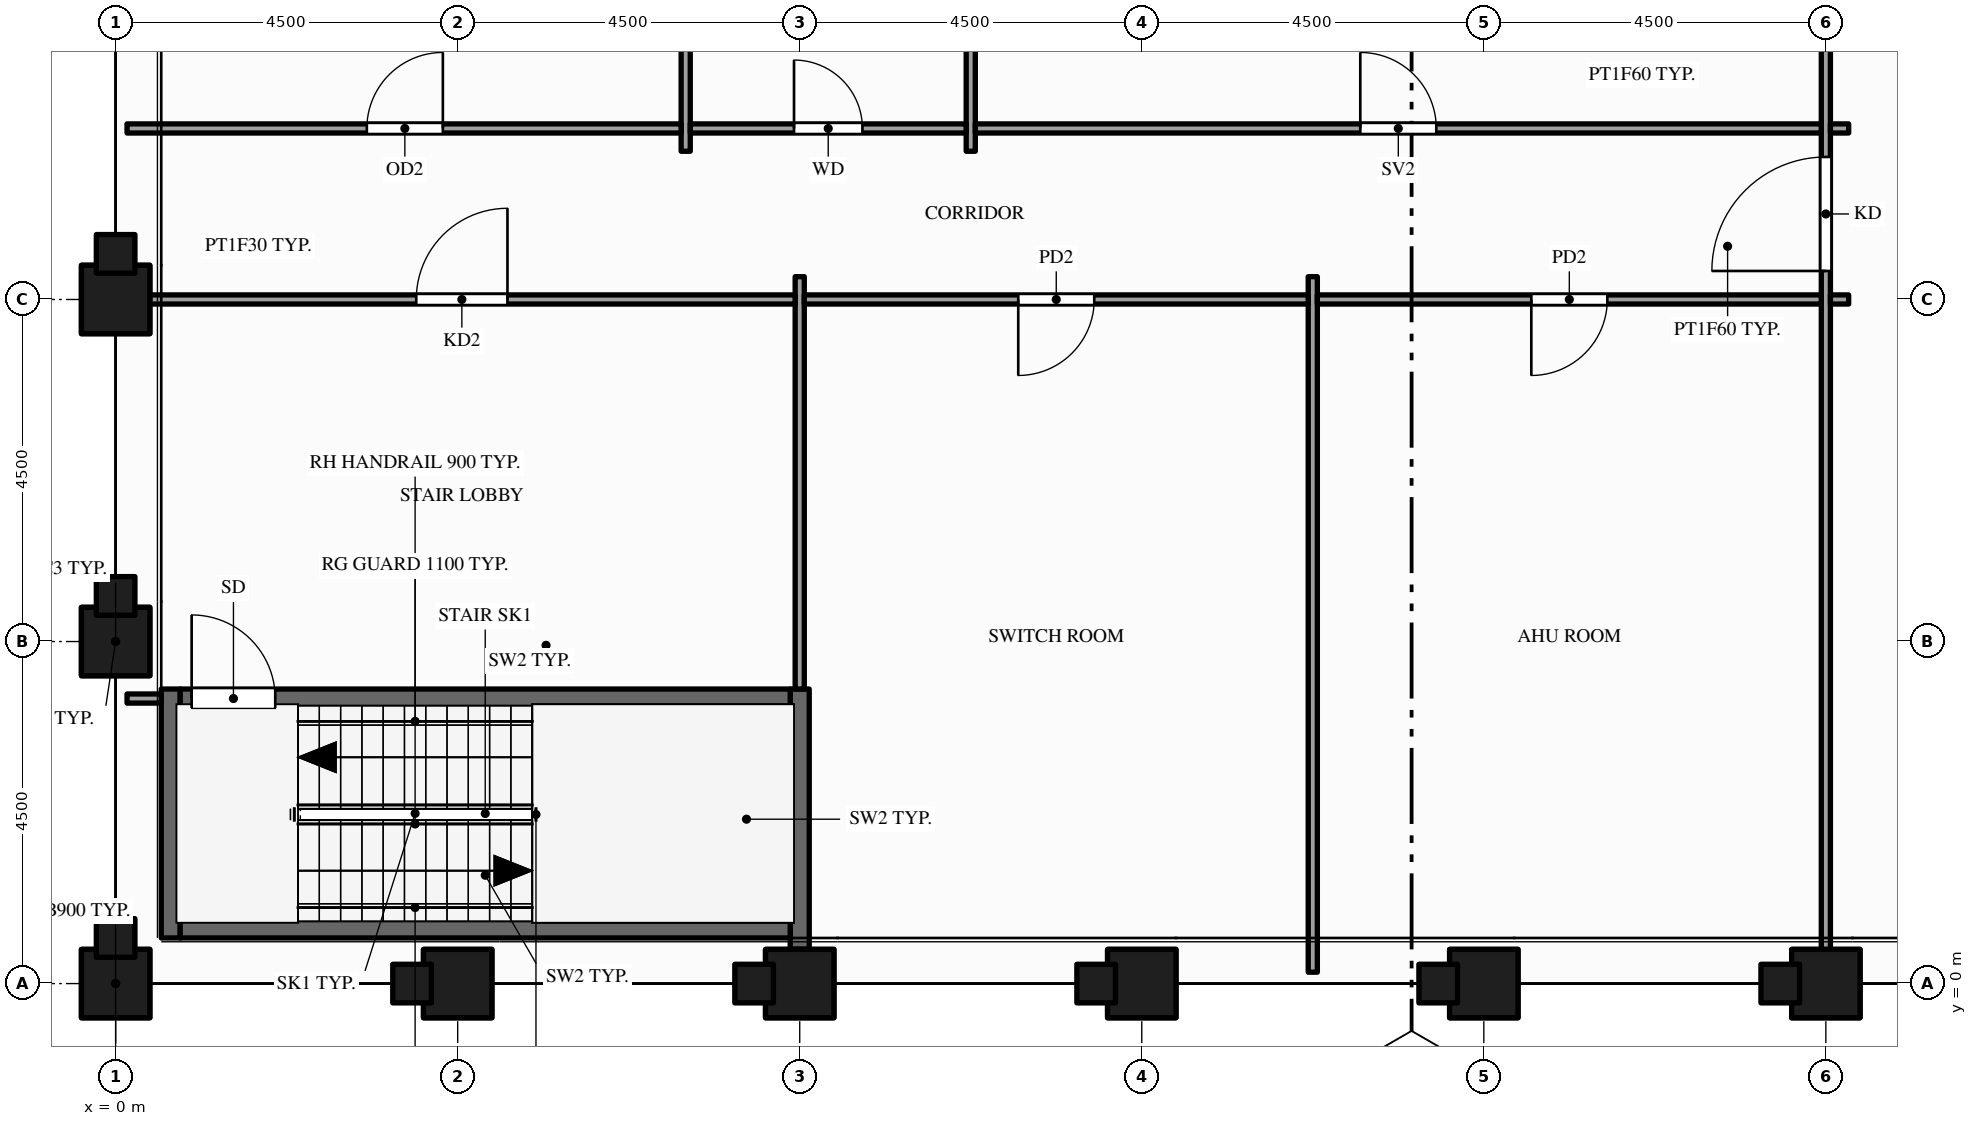
"""IFC4 building model, lengths in metres.
Left out: names, types, materials, properties, quantities, classifications, styles, units other than length and angle.
Written with IfcOpenShell. Run it as: python <this file> out.ifc"""

import sys

from ifc_helpers import new_model, si_unit, direction, frame, frame_2d, origin, origin_2d, place, context, subcontext, project, spatial, rectangle, hollow_rectangle, extrude, element, fill, save


model = new_model("IFC4")
c1 = context("Model", 3, precision=1e-05, world=origin(), true_north=direction((0.0, 1.0)))
c2 = subcontext(c1, "Body", "Model", "MODEL_VIEW")
j1 = project(units=[si_unit("LENGTHUNIT", "METRE"), si_unit("PLANEANGLEUNIT", "RADIAN")], contexts=[c1])
p1 = place(None, origin())
s1 = spatial("IfcSite", under=j1, at=p1, CompositionType="ELEMENT")
p2 = place(p1, origin())
s2 = spatial("IfcBuilding", under=s1, at=p2, CompositionType="ELEMENT")
p3 = place(p2, frame((0.0, 0.0, 187.0)))
s3 = spatial("IfcBuildingStorey", under=s2, at=p3, CompositionType="ELEMENT", Elevation=187.0)
p4 = place(p3, frame((0.0, 0.0, -0.25), z_axis=(0.0, 0.0, 1.0), x_axis=(1.0, 0.0, 0.0)))
e1 = element("IfcColumn", 1, at=p4, inside=s3, PredefinedType="COLUMN", context=c2, shape_type="SweptSolid", body=[
    extrude(hollow_rectangle(XDim=0.9, YDim=0.9, WallThickness=0.045, at=origin_2d()), origin(), (0.0, 0.0, 1.0), 6.6),
])
p5 = place(p3, frame((0.0, 0.0, 6.35), z_axis=(0.0, 0.0, 1.0), x_axis=(1.0, 0.0, 0.0)))
e2 = element("IfcColumn", 2, at=p5, inside=s3, PredefinedType="COLUMN", context=c2, shape_type="SweptSolid", body=[
    extrude(rectangle(XDim=0.9, YDim=0.9, at=origin_2d()), origin(), (0.0, 0.0, 1.0), 1.5),
])
p6 = place(p3, frame((0.0, 4.5, -0.25), z_axis=(0.0, 0.0, 1.0), x_axis=(1.0, 0.0, 0.0)))
e3 = element("IfcColumn", 3, at=p6, inside=s3, PredefinedType="COLUMN", context=c2, shape_type="SweptSolid", body=[
    extrude(hollow_rectangle(XDim=0.9, YDim=0.9, WallThickness=0.045, at=origin_2d()), origin(), (0.0, 0.0, 1.0), 6.6),
])
p7 = place(p3, frame((0.0, 4.5, 6.35), z_axis=(0.0, 0.0, 1.0), x_axis=(1.0, 0.0, 0.0)))
e4 = element("IfcColumn", 4, at=p7, inside=s3, PredefinedType="COLUMN", context=c2, shape_type="SweptSolid", body=[
    extrude(rectangle(XDim=0.9, YDim=0.9, at=origin_2d()), origin(), (0.0, 0.0, 1.0), 1.5),
])
p8 = place(p3, frame((0.0, 9.0, -0.25), z_axis=(0.0, 0.0, 1.0), x_axis=(1.0, 0.0, 0.0)))
e5 = element("IfcColumn", 5, at=p8, inside=s3, PredefinedType="COLUMN", context=c2, shape_type="SweptSolid", body=[
    extrude(hollow_rectangle(XDim=0.9, YDim=0.9, WallThickness=0.045, at=origin_2d()), origin(), (0.0, 0.0, 1.0), 6.6),
])
p9 = place(p3, frame((0.0, 9.0, 6.35), z_axis=(0.0, 0.0, 1.0), x_axis=(1.0, 0.0, 0.0)))
e6 = element("IfcColumn", 6, at=p9, inside=s3, PredefinedType="COLUMN", context=c2, shape_type="SweptSolid", body=[
    extrude(rectangle(XDim=0.9, YDim=0.9, at=origin_2d()), origin(), (0.0, 0.0, 1.0), 1.5),
])
p10 = place(p3, frame((4.5, 0.0, -0.25), z_axis=(0.0, 0.0, 1.0), x_axis=(1.0, 0.0, 0.0)))
e7 = element("IfcColumn", 7, at=p10, inside=s3, PredefinedType="COLUMN", context=c2, shape_type="SweptSolid", body=[
    extrude(hollow_rectangle(XDim=0.9, YDim=0.9, WallThickness=0.045, at=origin_2d()), origin(), (0.0, 0.0, 1.0), 6.6),
])
p11 = place(p3, frame((4.5, 0.0, 6.35), z_axis=(0.0, 0.0, 1.0), x_axis=(1.0, 0.0, 0.0)))
e8 = element("IfcColumn", 8, at=p11, inside=s3, PredefinedType="COLUMN", context=c2, shape_type="SweptSolid", body=[
    extrude(rectangle(XDim=0.9, YDim=0.9, at=origin_2d()), origin(), (0.0, 0.0, 1.0), 1.5),
])
p12 = place(p3, frame((9.0, 0.0, -0.25), z_axis=(0.0, 0.0, 1.0), x_axis=(1.0, 0.0, 0.0)))
e9 = element("IfcColumn", 9, at=p12, inside=s3, PredefinedType="COLUMN", context=c2, shape_type="SweptSolid", body=[
    extrude(hollow_rectangle(XDim=0.9, YDim=0.9, WallThickness=0.045, at=origin_2d()), origin(), (0.0, 0.0, 1.0), 6.6),
])
p13 = place(p3, frame((9.0, 0.0, 6.35), z_axis=(0.0, 0.0, 1.0), x_axis=(1.0, 0.0, 0.0)))
e10 = element("IfcColumn", 10, at=p13, inside=s3, PredefinedType="COLUMN", context=c2, shape_type="SweptSolid", body=[
    extrude(rectangle(XDim=0.9, YDim=0.9, at=origin_2d()), origin(), (0.0, 0.0, 1.0), 1.5),
])
p14 = place(p3, frame((13.5, 0.0, -0.25), z_axis=(0.0, 0.0, 1.0), x_axis=(1.0, 0.0, 0.0)))
e11 = element("IfcColumn", 11, at=p14, inside=s3, PredefinedType="COLUMN", context=c2, shape_type="SweptSolid", body=[
    extrude(hollow_rectangle(XDim=0.9, YDim=0.9, WallThickness=0.045, at=origin_2d()), origin(), (0.0, 0.0, 1.0), 6.6),
])
p15 = place(p3, frame((13.5, 0.0, 6.35), z_axis=(0.0, 0.0, 1.0), x_axis=(1.0, 0.0, 0.0)))
e12 = element("IfcColumn", 12, at=p15, inside=s3, PredefinedType="COLUMN", context=c2, shape_type="SweptSolid", body=[
    extrude(rectangle(XDim=0.9, YDim=0.9, at=origin_2d()), origin(), (0.0, 0.0, 1.0), 1.5),
])
p16 = place(p3, frame((18.0, 0.0, -0.25), z_axis=(0.0, 0.0, 1.0), x_axis=(1.0, 0.0, 0.0)))
e13 = element("IfcColumn", 13, at=p16, inside=s3, PredefinedType="COLUMN", context=c2, shape_type="SweptSolid", body=[
    extrude(hollow_rectangle(XDim=0.9, YDim=0.9, WallThickness=0.045, at=origin_2d()), origin(), (0.0, 0.0, 1.0), 6.6),
])
p17 = place(p3, frame((18.0, 0.0, 6.35), z_axis=(0.0, 0.0, 1.0), x_axis=(1.0, 0.0, 0.0)))
e14 = element("IfcColumn", 14, at=p17, inside=s3, PredefinedType="COLUMN", context=c2, shape_type="SweptSolid", body=[
    extrude(rectangle(XDim=0.9, YDim=0.9, at=origin_2d()), origin(), (0.0, 0.0, 1.0), 1.5),
])
p18 = place(p3, frame((22.5, 0.0, -0.25), z_axis=(0.0, 0.0, 1.0), x_axis=(1.0, 0.0, 0.0)))
e15 = element("IfcColumn", 15, at=p18, inside=s3, PredefinedType="COLUMN", context=c2, shape_type="SweptSolid", body=[
    extrude(hollow_rectangle(XDim=0.9, YDim=0.9, WallThickness=0.045, at=origin_2d()), origin(), (0.0, 0.0, 1.0), 6.6),
])
p19 = place(p3, frame((22.5, 0.0, 6.35), z_axis=(0.0, 0.0, 1.0), x_axis=(1.0, 0.0, 0.0)))
e16 = element("IfcColumn", 16, at=p19, inside=s3, PredefinedType="COLUMN", context=c2, shape_type="SweptSolid", body=[
    extrude(rectangle(XDim=0.9, YDim=0.9, at=origin_2d()), origin(), (0.0, 0.0, 1.0), 1.5),
])
p20 = place(p3, frame((0.725, 0.6, 0.0), z_axis=(0.0, 0.0, 1.0), x_axis=(0.0, 1.0, 0.0)))
e17 = element("IfcWall", 17, at=p20, inside=s3, PredefinedType="SHEAR", context=c2, shape_type="SweptSolid", body=[
    extrude(rectangle(XDim=3.275, YDim=0.25, at=frame_2d((1.637, 0.0))), origin(), (0.0, 0.0, 1.0), 7.85),
])
p21 = place(p3, frame((7.5, 10.95, 0.0), z_axis=(0.0, 0.0, 1.0), x_axis=(0.0, 1.0, 0.0)))
e18 = element("IfcWall", 18, at=p21, inside=s3, PredefinedType="PARTITIONING", context=c2, shape_type="SweptSolid", body=[
    extrude(rectangle(XDim=11.85, YDim=0.12, at=frame_2d((5.925, 0.0))), origin(), (0.0, 0.0, 1.0), 6.6),
])
p22 = place(p3, frame((9.0, 0.15, 0.0), z_axis=(0.0, 0.0, 1.0), x_axis=(0.0, 1.0, 0.0)))
e19 = element("IfcWall", 19, at=p22, inside=s3, PredefinedType="PARTITIONING", context=c2, shape_type="SweptSolid", body=[
    extrude(rectangle(XDim=0.3, YDim=0.12, at=frame_2d((0.15, 0.0))), origin(), (0.0, 0.0, 1.0), 7.85),
])
p23 = place(p3, frame((9.0, 0.45, 0.0), z_axis=(0.0, 0.0, 1.0), x_axis=(0.0, 1.0, 0.0)))
e20 = element("IfcWall", 20, at=p23, inside=s3, PredefinedType="SHEAR", context=c2, shape_type="SweptSolid", body=[
    extrude(rectangle(XDim=3.425, YDim=0.25, at=frame_2d((1.712, 0.0))), origin(), (0.0, 0.0, 1.0), 7.85),
])
p24 = place(p3, frame((9.0, 3.875, 0.0), z_axis=(0.0, 0.0, 1.0), x_axis=(0.0, 1.0, 0.0)))
e21 = element("IfcWall", 21, at=p24, inside=s3, PredefinedType="PARTITIONING", context=c2, shape_type="SweptSolid", body=[
    extrude(rectangle(XDim=5.425, YDim=0.12, at=frame_2d((2.712, 0.0))), origin(), (0.0, 0.0, 1.0), 6.87),
])
p25 = place(p3, frame((11.25, 10.95, 0.0), z_axis=(0.0, 0.0, 1.0), x_axis=(0.0, 1.0, 0.0)))
e22 = element("IfcWall", 22, at=p25, inside=s3, PredefinedType="PARTITIONING", context=c2, shape_type="SweptSolid", body=[
    extrude(rectangle(XDim=11.85, YDim=0.12, at=frame_2d((5.925, 0.0))), origin(), (0.0, 0.0, 1.0), 6.6),
])
p26 = place(p3, frame((15.75, 0.15, 0.0), z_axis=(0.0, 0.0, 1.0), x_axis=(0.0, 1.0, 0.0)))
e23 = element("IfcWall", 23, at=p26, inside=s3, PredefinedType="PARTITIONING", context=c2, shape_type="SweptSolid", body=[
    extrude(rectangle(XDim=9.15, YDim=0.12, at=frame_2d((4.575, 0.0))), origin(), (0.0, 0.0, 1.0), 6.87),
])
p27 = place(p3, frame((22.5, 0.15, 0.0), z_axis=(0.0, 0.0, 1.0), x_axis=(0.0, 1.0, 0.0)))
e24 = element("IfcWall", 24, at=p27, inside=s3, PredefinedType="PARTITIONING", context=c2, shape_type="SweptSolid", body=[
    extrude(rectangle(XDim=22.65, YDim=0.12, at=frame_2d((11.325, 0.0))), origin(), (0.0, 0.0, 1.0), 6.87),
])
p28 = place(p27, frame((9.225, 0.0, 0.0)))
e25 = element("IfcOpeningElement", 25, at=p28, cuts=e24, PredefinedType="OPENING", context=c2, shape_type="SweptSolid", body=[
    extrude(rectangle(XDim=1.5, YDim=2.1, at=frame_2d((0.75, 1.05))), frame((0.0, 0.07, 0.0), z_axis=(0.0, -1.0, 0.0), x_axis=(1.0, 0.0, 0.0)), (0.0, 0.0, 1.0), 0.14),
])
p29 = place(p3, frame((0.85, 0.725, 0.0), z_axis=(0.0, 0.0, 1.0), x_axis=(1.0, 0.0, 0.0)))
e26 = element("IfcWall", 26, at=p29, inside=s3, PredefinedType="SHEAR", context=c2, shape_type="SweptSolid", body=[
    extrude(rectangle(XDim=8.025, YDim=0.25, at=frame_2d((4.012, 0.0))), origin(), (0.0, 0.0, 1.0), 7.85),
])
p30 = place(p3, frame((0.15, 3.75, 0.0), z_axis=(0.0, 0.0, 1.0), x_axis=(1.0, 0.0, 0.0)))
e27 = element("IfcWall", 27, at=p30, inside=s3, PredefinedType="PARTITIONING", context=c2, shape_type="SweptSolid", body=[
    extrude(rectangle(XDim=0.45, YDim=0.12, at=frame_2d((0.225, 0.0))), origin(), (0.0, 0.0, 1.0), 7.85),
])
p31 = place(p3, frame((0.85, 3.75, 0.0), z_axis=(0.0, 0.0, 1.0), x_axis=(1.0, 0.0, 0.0)))
e28 = element("IfcWall", 28, at=p31, inside=s3, PredefinedType="SHEAR", context=c2, shape_type="SweptSolid", body=[
    extrude(rectangle(XDim=8.025, YDim=0.25, at=frame_2d((4.012, 0.0))), origin(), (0.0, 0.0, 1.0), 7.85),
])
p32 = place(p31, frame((0.15, 0.0, 0.0)))
e29 = element("IfcOpeningElement", 29, at=p32, cuts=e28, PredefinedType="OPENING", context=c2, shape_type="SweptSolid", body=[
    extrude(rectangle(XDim=1.1, YDim=2.1, at=frame_2d((0.55, 1.05))), frame((0.0, 0.135, 0.0), z_axis=(0.0, -1.0, 0.0), x_axis=(1.0, 0.0, 0.0)), (0.0, 0.0, 1.0), 0.27),
])
p33 = place(p3, frame((0.15, 9.0, 0.0), z_axis=(0.0, 0.0, 1.0), x_axis=(1.0, 0.0, 0.0)))
e30 = element("IfcWall", 30, at=p33, inside=s3, PredefinedType="PARTITIONING", context=c2, shape_type="SweptSolid", body=[
    extrude(rectangle(XDim=8.79, YDim=0.12, at=frame_2d((4.395, 0.0))), origin(), (0.0, 0.0, 1.0), 6.87),
])
p34 = place(p33, frame((3.805, 0.0, 0.0)))
e31 = element("IfcOpeningElement", 31, at=p34, cuts=e30, PredefinedType="OPENING", context=c2, shape_type="SweptSolid", body=[
    extrude(rectangle(XDim=1.2, YDim=2.1, at=frame_2d((0.6, 1.05))), frame((0.0, 0.07, 0.0), z_axis=(0.0, -1.0, 0.0), x_axis=(1.0, 0.0, 0.0)), (0.0, 0.0, 1.0), 0.14),
])
p35 = place(p3, frame((9.06, 9.0, 0.0), z_axis=(0.0, 0.0, 1.0), x_axis=(1.0, 0.0, 0.0)))
e32 = element("IfcWall", 32, at=p35, inside=s3, PredefinedType="PARTITIONING", context=c2, shape_type="SweptSolid", body=[
    extrude(rectangle(XDim=6.63, YDim=0.12, at=frame_2d((3.315, 0.0))), origin(), (0.0, 0.0, 1.0), 6.87),
])
p36 = place(p35, frame((2.815, 0.0, 0.0)))
e33 = element("IfcOpeningElement", 33, at=p36, cuts=e32, PredefinedType="OPENING", context=c2, shape_type="SweptSolid", body=[
    extrude(rectangle(XDim=1.0, YDim=2.1, at=frame_2d((0.5, 1.05))), frame((0.0, 0.07, 0.0), z_axis=(0.0, -1.0, 0.0), x_axis=(1.0, 0.0, 0.0)), (0.0, 0.0, 1.0), 0.14),
])
p37 = place(p3, frame((15.81, 9.0, 0.0), z_axis=(0.0, 0.0, 1.0), x_axis=(1.0, 0.0, 0.0)))
e34 = element("IfcWall", 34, at=p37, inside=s3, PredefinedType="PARTITIONING", context=c2, shape_type="SweptSolid", body=[
    extrude(rectangle(XDim=6.63, YDim=0.12, at=frame_2d((3.315, 0.0))), origin(), (0.0, 0.0, 1.0), 6.87),
])
p38 = place(p37, frame((2.815, 0.0, 0.0)))
e35 = element("IfcOpeningElement", 35, at=p38, cuts=e34, PredefinedType="OPENING", context=c2, shape_type="SweptSolid", body=[
    extrude(rectangle(XDim=1.0, YDim=2.1, at=frame_2d((0.5, 1.05))), frame((0.0, 0.07, 0.0), z_axis=(0.0, -1.0, 0.0), x_axis=(1.0, 0.0, 0.0)), (0.0, 0.0, 1.0), 0.14),
])
p39 = place(p3, frame((22.56, 9.0, 0.0), z_axis=(0.0, 0.0, 1.0), x_axis=(1.0, 0.0, 0.0)))
e36 = element("IfcWall", 36, at=p39, inside=s3, PredefinedType="PARTITIONING", context=c2, shape_type="SweptSolid", body=[
    extrude(rectangle(XDim=0.24, YDim=0.12, at=frame_2d((0.12, 0.0))), origin(), (0.0, 0.0, 1.0), 6.87),
])
p40 = place(p3, frame((0.15, 11.25, 0.0), z_axis=(0.0, 0.0, 1.0), x_axis=(1.0, 0.0, 0.0)))
e37 = element("IfcWall", 37, at=p40, inside=s3, PredefinedType="PARTITIONING", context=c2, shape_type="SweptSolid", body=[
    extrude(rectangle(XDim=7.29, YDim=0.12, at=frame_2d((3.645, 0.0))), origin(), (0.0, 0.0, 1.0), 6.87),
])
p41 = place(p40, frame((3.155, 0.0, 0.0)))
e38 = element("IfcOpeningElement", 38, at=p41, cuts=e37, PredefinedType="OPENING", context=c2, shape_type="SweptSolid", body=[
    extrude(rectangle(XDim=1.0, YDim=2.1, at=frame_2d((0.5, 1.05))), frame((0.0, 0.07, 0.0), z_axis=(0.0, -1.0, 0.0), x_axis=(1.0, 0.0, 0.0)), (0.0, 0.0, 1.0), 0.14),
])
p42 = place(p3, frame((7.56, 11.25, 0.0), z_axis=(0.0, 0.0, 1.0), x_axis=(1.0, 0.0, 0.0)))
e39 = element("IfcWall", 39, at=p42, inside=s3, PredefinedType="PARTITIONING", context=c2, shape_type="SweptSolid", body=[
    extrude(rectangle(XDim=3.63, YDim=0.12, at=frame_2d((1.815, 0.0))), origin(), (0.0, 0.0, 1.0), 6.87),
])
p43 = place(p42, frame((1.365, 0.0, 0.0)))
e40 = element("IfcOpeningElement", 40, at=p43, cuts=e39, PredefinedType="OPENING", context=c2, shape_type="SweptSolid", body=[
    extrude(rectangle(XDim=0.9, YDim=2.1, at=frame_2d((0.45, 1.05))), frame((0.0, 0.07, 0.0), z_axis=(0.0, -1.0, 0.0), x_axis=(1.0, 0.0, 0.0)), (0.0, 0.0, 1.0), 0.14),
])
p44 = place(p3, frame((11.31, 11.25, 0.0), z_axis=(0.0, 0.0, 1.0), x_axis=(1.0, 0.0, 0.0)))
e41 = element("IfcWall", 41, at=p44, inside=s3, PredefinedType="PARTITIONING", context=c2, shape_type="SweptSolid", body=[
    extrude(rectangle(XDim=11.13, YDim=0.12, at=frame_2d((5.565, 0.0))), origin(), (0.0, 0.0, 1.0), 6.87),
])
p45 = place(p44, frame((5.065, 0.0, 0.0)))
e42 = element("IfcOpeningElement", 42, at=p45, cuts=e41, PredefinedType="OPENING", context=c2, shape_type="SweptSolid", body=[
    extrude(rectangle(XDim=1.0, YDim=2.1, at=frame_2d((0.5, 1.05))), frame((0.0, 0.07, 0.0), z_axis=(0.0, -1.0, 0.0), x_axis=(1.0, 0.0, 0.0)), (0.0, 0.0, 1.0), 0.14),
])
p46 = place(p3, frame((22.56, 11.25, 0.0), z_axis=(0.0, 0.0, 1.0), x_axis=(1.0, 0.0, 0.0)))
e43 = element("IfcWall", 43, at=p46, inside=s3, PredefinedType="PARTITIONING", context=c2, shape_type="SweptSolid", body=[
    extrude(rectangle(XDim=0.24, YDim=0.12, at=frame_2d((0.12, 0.0))), origin(), (0.0, 0.0, 1.0), 6.87),
])
p47 = place(p32, origin())
e44 = element("IfcDoor", 44, at=p47, inside=s3, OperationType="SINGLE_SWING_LEFT", PredefinedType="DOOR", context=c2, shape_type="SweptSolid", body=[
    extrude(rectangle(XDim=1.1, YDim=2.1, at=frame_2d((0.55, 1.05))), frame((0.0, 0.025, 0.0), z_axis=(0.0, -1.0, 0.0), x_axis=(1.0, 0.0, 0.0)), (0.0, 0.0, 1.0), 0.05),
])
fill(e29, e44)
p48 = place(p34, origin())
e45 = element("IfcDoor", 45, at=p48, inside=s3, OperationType="SINGLE_SWING_RIGHT", PredefinedType="DOOR", context=c2, shape_type="SweptSolid", body=[
    extrude(rectangle(XDim=1.2, YDim=2.1, at=frame_2d((0.6, 1.05))), frame((0.0, 0.025, 0.0), z_axis=(0.0, -1.0, 0.0), x_axis=(1.0, 0.0, 0.0)), (0.0, 0.0, 1.0), 0.05),
])
fill(e31, e45)
p49 = place(p36, origin())
e46 = element("IfcDoor", 46, at=p49, inside=s3, OperationType="SINGLE_SWING_LEFT", PredefinedType="DOOR", context=c2, shape_type="SweptSolid", body=[
    extrude(rectangle(XDim=1.0, YDim=2.1, at=frame_2d((0.5, 1.05))), frame((0.0, 0.025, 0.0), z_axis=(0.0, -1.0, 0.0), x_axis=(1.0, 0.0, 0.0)), (0.0, 0.0, 1.0), 0.05),
])
fill(e33, e46)
p50 = place(p38, origin())
e47 = element("IfcDoor", 47, at=p50, inside=s3, OperationType="SINGLE_SWING_LEFT", PredefinedType="DOOR", context=c2, shape_type="SweptSolid", body=[
    extrude(rectangle(XDim=1.0, YDim=2.1, at=frame_2d((0.5, 1.05))), frame((0.0, 0.025, 0.0), z_axis=(0.0, -1.0, 0.0), x_axis=(1.0, 0.0, 0.0)), (0.0, 0.0, 1.0), 0.05),
])
fill(e35, e47)
p51 = place(p43, origin())
e48 = element("IfcDoor", 48, at=p51, inside=s3, OperationType="SINGLE_SWING_LEFT", PredefinedType="DOOR", context=c2, shape_type="SweptSolid", body=[
    extrude(rectangle(XDim=0.9, YDim=2.1, at=frame_2d((0.45, 1.05))), frame((0.0, 0.025, 0.0), z_axis=(0.0, -1.0, 0.0), x_axis=(1.0, 0.0, 0.0)), (0.0, 0.0, 1.0), 0.05),
])
fill(e40, e48)
p52 = place(p41, origin())
e49 = element("IfcDoor", 49, at=p52, inside=s3, OperationType="SINGLE_SWING_RIGHT", PredefinedType="DOOR", context=c2, shape_type="SweptSolid", body=[
    extrude(rectangle(XDim=1.0, YDim=2.1, at=frame_2d((0.5, 1.05))), frame((0.0, 0.025, 0.0), z_axis=(0.0, -1.0, 0.0), x_axis=(1.0, 0.0, 0.0)), (0.0, 0.0, 1.0), 0.05),
])
fill(e38, e49)
p53 = place(p45, origin())
e50 = element("IfcDoor", 50, at=p53, inside=s3, OperationType="SINGLE_SWING_LEFT", PredefinedType="DOOR", context=c2, shape_type="SweptSolid", body=[
    extrude(rectangle(XDim=1.0, YDim=2.1, at=frame_2d((0.5, 1.05))), frame((0.0, 0.025, 0.0), z_axis=(0.0, -1.0, 0.0), x_axis=(1.0, 0.0, 0.0)), (0.0, 0.0, 1.0), 0.05),
])
fill(e42, e50)
p54 = place(p28, origin())
e51 = element("IfcDoor", 51, at=p54, inside=s3, OperationType="SINGLE_SWING_LEFT", PredefinedType="DOOR", context=c2, shape_type="SweptSolid", body=[
    extrude(rectangle(XDim=1.5, YDim=2.1, at=frame_2d((0.75, 1.05))), frame((0.0, 0.025, 0.0), z_axis=(0.0, -1.0, 0.0), x_axis=(1.0, 0.0, 0.0)), (0.0, 0.0, 1.0), 0.05),
])
fill(e25, e51)
save(model, sys.argv[1])
